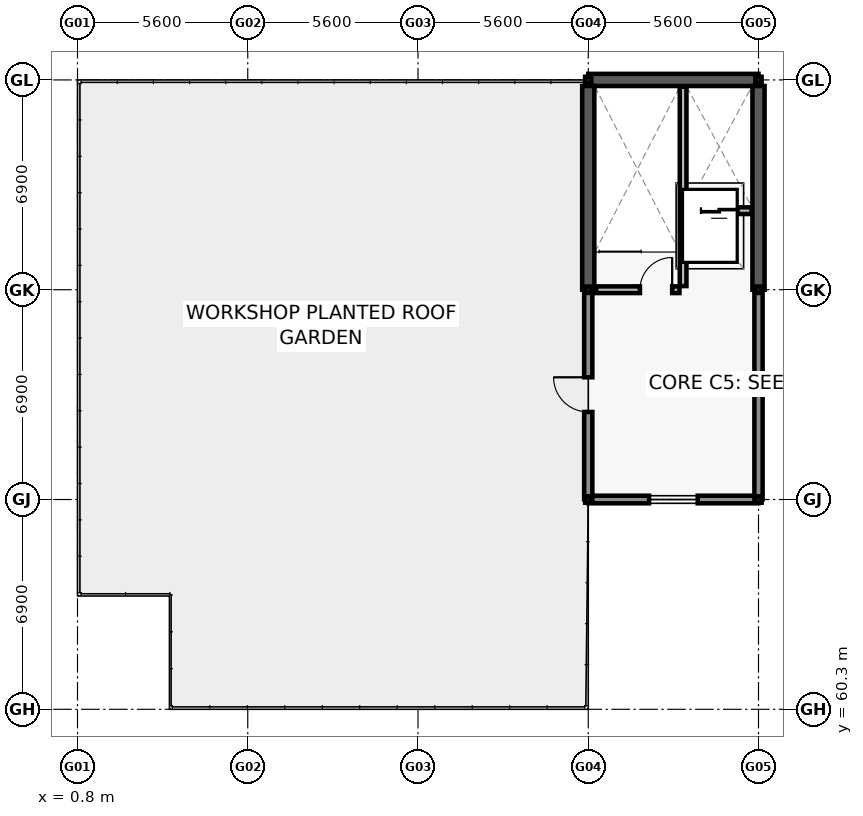
"""IFC4 building model, lengths in metres.
Left out: names, types, materials, properties, quantities, classifications, styles, units other than length and angle.
Written with IfcOpenShell. Run it as: python <this file> out.ifc"""

import sys

from ifc_helpers import new_model, si_unit, direction, frame, frame_2d, origin, origin_2d, place, context, subcontext, project, spatial, rectangle, i_section, extrude, element, fill, save


model = new_model("IFC4")
c1 = context("Model", 3, precision=1e-05, world=origin(), true_north=direction((0.0, 1.0)))
c2 = subcontext(c1, "Body", "Model", "MODEL_VIEW")
j1 = project(units=[si_unit("LENGTHUNIT", "METRE"), si_unit("PLANEANGLEUNIT", "RADIAN")], contexts=[c1])
p1 = place(None, origin())
s1 = spatial("IfcSite", under=j1, at=p1, CompositionType="ELEMENT")
p2 = place(p1, origin())
s2 = spatial("IfcBuilding", under=s1, at=p2, CompositionType="ELEMENT")
p3 = place(p2, frame((0.0, 0.0, 9.6)))
s3 = spatial("IfcBuildingStorey", under=s2, at=p3, CompositionType="ELEMENT", Elevation=9.6)
for number, where, z_axis, x_axis in (
    (1, (17.6, 67.2, 0.0), (0.0, 0.0, 1.0), (1.0, 0.0, 0.0)),
    (2, (17.6, 74.1, 0.0), (0.0, 0.0, 1.0), (1.0, 0.0, 0.0)),
    (3, (17.6, 81.0, 0.0), (0.0, 0.0, 1.0), (1.0, 0.0, 0.0)),
    (4, (23.2, 67.2, 0.0), (0.0, 0.0, 1.0), (1.0, 0.0, 0.0)),
    (5, (23.2, 74.1, 0.0), (0.0, 0.0, 1.0), (1.0, 0.0, 0.0)),
    (6, (23.2, 81.0, 0.0), (0.0, 0.0, 1.0), (1.0, 0.0, 0.0)),
):
    element("IfcColumn", number, at=place(p3, frame(where, z_axis=z_axis, x_axis=x_axis)), inside=s3, PredefinedType="COLUMN", context=c2, shape_type="SweptSolid", body=[
        extrude(i_section(OverallWidth=0.205, OverallDepth=0.21, WebThickness=0.009, FlangeThickness=0.014, FilletRadius=0.011, at=origin_2d()), origin(), (0.0, 0.0, 1.0), 3.9),
    ])
p4 = place(p3, frame((17.6, 81.0, 0.0), z_axis=(0.0, 0.0, 1.0), x_axis=(1.0, 0.0, 0.0)))
e7 = element("IfcWall", 7, at=p4, inside=s3, PredefinedType="SHEAR", context=c2, shape_type="SweptSolid", body=[
    extrude(rectangle(XDim=5.6, YDim=0.4, at=frame_2d((2.8, 0.0))), origin(), (0.0, 0.0, 1.0), 3.66),
])
for number, where, z_axis, x_axis in (
    (8, (17.6, 74.1, 0.0), (0.0, 0.0, 1.0), (0.0, 1.0, 0.0)),
    (9, (23.2, 74.1, 0.0), (0.0, 0.0, 1.0), (0.0, 1.0, 0.0)),
):
    element("IfcWall", number, at=place(p3, frame(where, z_axis=z_axis, x_axis=x_axis)), inside=s3, PredefinedType="SHEAR", context=c2, shape_type="SweptSolid", body=[
        extrude(rectangle(XDim=6.7, YDim=0.4, at=frame_2d((3.35, 0.0))), origin(), (0.0, 0.0, 1.0), 3.66),
    ])
p5 = place(p3, frame((23.195, 67.2, 0.0), z_axis=(0.0, 0.0, 1.0), x_axis=(-1.0, 0.0, 0.0)))
e10 = element("IfcWall", 10, at=p5, inside=s3, PredefinedType="SOLIDWALL", context=c2, shape_type="SweptSolid", body=[
    extrude(rectangle(XDim=5.59, YDim=0.25, at=frame_2d((2.795, 0.0))), origin(), (0.0, 0.0, 1.0), 3.02),
])
p6 = place(p5, frame((1.995, 0.0, 0.8)))
e11 = element("IfcOpeningElement", 11, at=p6, cuts=e10, PredefinedType="OPENING", context=c2, shape_type="SweptSolid", body=[
    extrude(rectangle(XDim=1.6, YDim=1.8, at=frame_2d((0.8, 0.9))), frame((0.0, 0.135, 0.0), z_axis=(0.0, -1.0, 0.0), x_axis=(1.0, 0.0, 0.0)), (0.0, 0.0, 1.0), 0.27),
])
p7 = place(p3, frame((17.6, 67.205, 0.0), z_axis=(0.0, 0.0, 1.0), x_axis=(0.0, 1.0, 0.0)))
e12 = element("IfcWall", 12, at=p7, inside=s3, PredefinedType="SOLIDWALL", context=c2, shape_type="SweptSolid", body=[
    extrude(rectangle(XDim=6.89, YDim=0.27, at=frame_2d((3.445, 0.0))), origin(), (0.0, 0.0, 1.0), 3.02),
])
p8 = place(p7, frame((2.875, 0.0, 0.0)))
e13 = element("IfcOpeningElement", 13, at=p8, cuts=e12, PredefinedType="OPENING", context=c2, shape_type="SweptSolid", body=[
    extrude(rectangle(XDim=1.14, YDim=2.14, at=frame_2d((0.57, 1.07))), frame((0.0, 0.145, 0.0), z_axis=(0.0, -1.0, 0.0), x_axis=(1.0, 0.0, 0.0)), (0.0, 0.0, 1.0), 0.29),
])
p9 = place(p3, frame((23.2, 74.095, 0.0), z_axis=(0.0, 0.0, 1.0), x_axis=(0.0, -1.0, 0.0)))
e14 = element("IfcWall", 14, at=p9, inside=s3, PredefinedType="SOLIDWALL", context=c2, shape_type="SweptSolid", body=[
    extrude(rectangle(XDim=6.89, YDim=0.27, at=frame_2d((3.445, 0.0))), origin(), (0.0, 0.0, 1.0), 3.02),
])
p10 = place(p3, frame((20.72, 74.22, 0.0), z_axis=(0.0, 0.0, 1.0), x_axis=(0.0, 1.0, 0.0)))
e15 = element("IfcWall", 15, at=p10, inside=s3, PredefinedType="SOLIDWALL", context=c2, shape_type="SweptSolid", body=[
    extrude(rectangle(XDim=6.555, YDim=0.22, at=frame_2d((3.277, 0.0))), origin(), (0.0, 0.0, 1.0), 3.02),
])
p11 = place(p3, frame((17.86, 74.1, 0.0), z_axis=(0.0, 0.0, 1.0), x_axis=(1.0, 0.0, 0.0)))
e16 = element("IfcWall", 16, at=p11, inside=s3, PredefinedType="SOLIDWALL", context=c2, shape_type="SweptSolid", body=[
    extrude(rectangle(XDim=2.74, YDim=0.22, at=frame_2d((1.37, 0.0))), origin(), (0.0, 0.0, 1.0), 3.02),
])
p12 = place(p11, frame((1.44, 0.0, 0.0)))
e17 = element("IfcOpeningElement", 17, at=p12, cuts=e16, PredefinedType="OPENING", context=c2, shape_type="SweptSolid", body=[
    extrude(rectangle(XDim=1.06, YDim=2.1, at=frame_2d((0.53, 1.05))), frame((0.0, 0.12, 0.0), z_axis=(0.0, -1.0, 0.0), x_axis=(1.0, 0.0, 0.0)), (0.0, 0.0, 1.0), 0.24),
])
p13 = place(p3, frame((20.84, 76.7, 0.0), z_axis=(0.0, 0.0, 1.0), x_axis=(1.0, 0.0, 0.0)))
e18 = element("IfcWall", 18, at=p13, inside=s3, PredefinedType="SOLIDWALL", context=c2, shape_type="SweptSolid", body=[
    extrude(rectangle(XDim=2.135, YDim=0.22, at=frame_2d((1.067, 0.0))), origin(), (0.0, 0.0, 1.0), 3.02),
])
p14 = place(p13, frame((0.468, 0.0, 0.0)))
e19 = element("IfcOpeningElement", 19, at=p14, cuts=e18, PredefinedType="OPENING", context=c2, shape_type="SweptSolid", body=[
    extrude(rectangle(XDim=1.2, YDim=2.15, at=frame_2d((0.6, 1.075))), frame((0.0, 0.12, 0.0), z_axis=(0.0, -1.0, 0.0), x_axis=(1.0, 0.0, 0.0)), (0.0, 0.0, 1.0), 0.24),
])
p15 = place(p6, origin())
e20 = element("IfcWindow", 20, at=p15, inside=s3, PartitioningType="DOUBLE_PANEL_VERTICAL", PredefinedType="WINDOW", context=c2, shape_type="SweptSolid", body=[
    extrude(rectangle(XDim=1.6, YDim=1.8, at=frame_2d((0.8, 0.9))), frame((0.0, 0.03, 0.0), z_axis=(0.0, -1.0, 0.0), x_axis=(1.0, 0.0, 0.0)), (0.0, 0.0, 1.0), 0.06),
])
fill(e11, e20)
p16 = place(p8, origin())
e21 = element("IfcDoor", 21, at=p16, inside=s3, OperationType="SINGLE_SWING_RIGHT", PredefinedType="DOOR", context=c2, shape_type="SweptSolid", body=[
    extrude(rectangle(XDim=1.14, YDim=2.14, at=frame_2d((0.57, 1.07))), frame((0.0, 0.025, 0.0), z_axis=(0.0, -1.0, 0.0), x_axis=(1.0, 0.0, 0.0)), (0.0, 0.0, 1.0), 0.05),
])
fill(e13, e21)
p17 = place(p12, origin())
e22 = element("IfcDoor", 22, at=p17, inside=s3, OperationType="SINGLE_SWING_RIGHT", PredefinedType="DOOR", context=c2, shape_type="SweptSolid", body=[
    extrude(rectangle(XDim=1.06, YDim=2.1, at=frame_2d((0.53, 1.05))), frame((0.0, 0.025, 0.0), z_axis=(0.0, -1.0, 0.0), x_axis=(1.0, 0.0, 0.0)), (0.0, 0.0, 1.0), 0.05),
])
fill(e17, e22)
p18 = place(p14, origin())
e23 = element("IfcDoor", 23, at=p18, inside=s3, OperationType="DOUBLE_DOOR_SLIDING", PredefinedType="DOOR", context=c2, shape_type="SweptSolid", body=[
    extrude(rectangle(XDim=1.2, YDim=2.15, at=frame_2d((0.6, 1.075))), frame((0.0, 0.025, 0.0), z_axis=(0.0, -1.0, 0.0), x_axis=(1.0, 0.0, 0.0)), (0.0, 0.0, 1.0), 0.05),
])
fill(e19, e23)
save(model, sys.argv[1])
